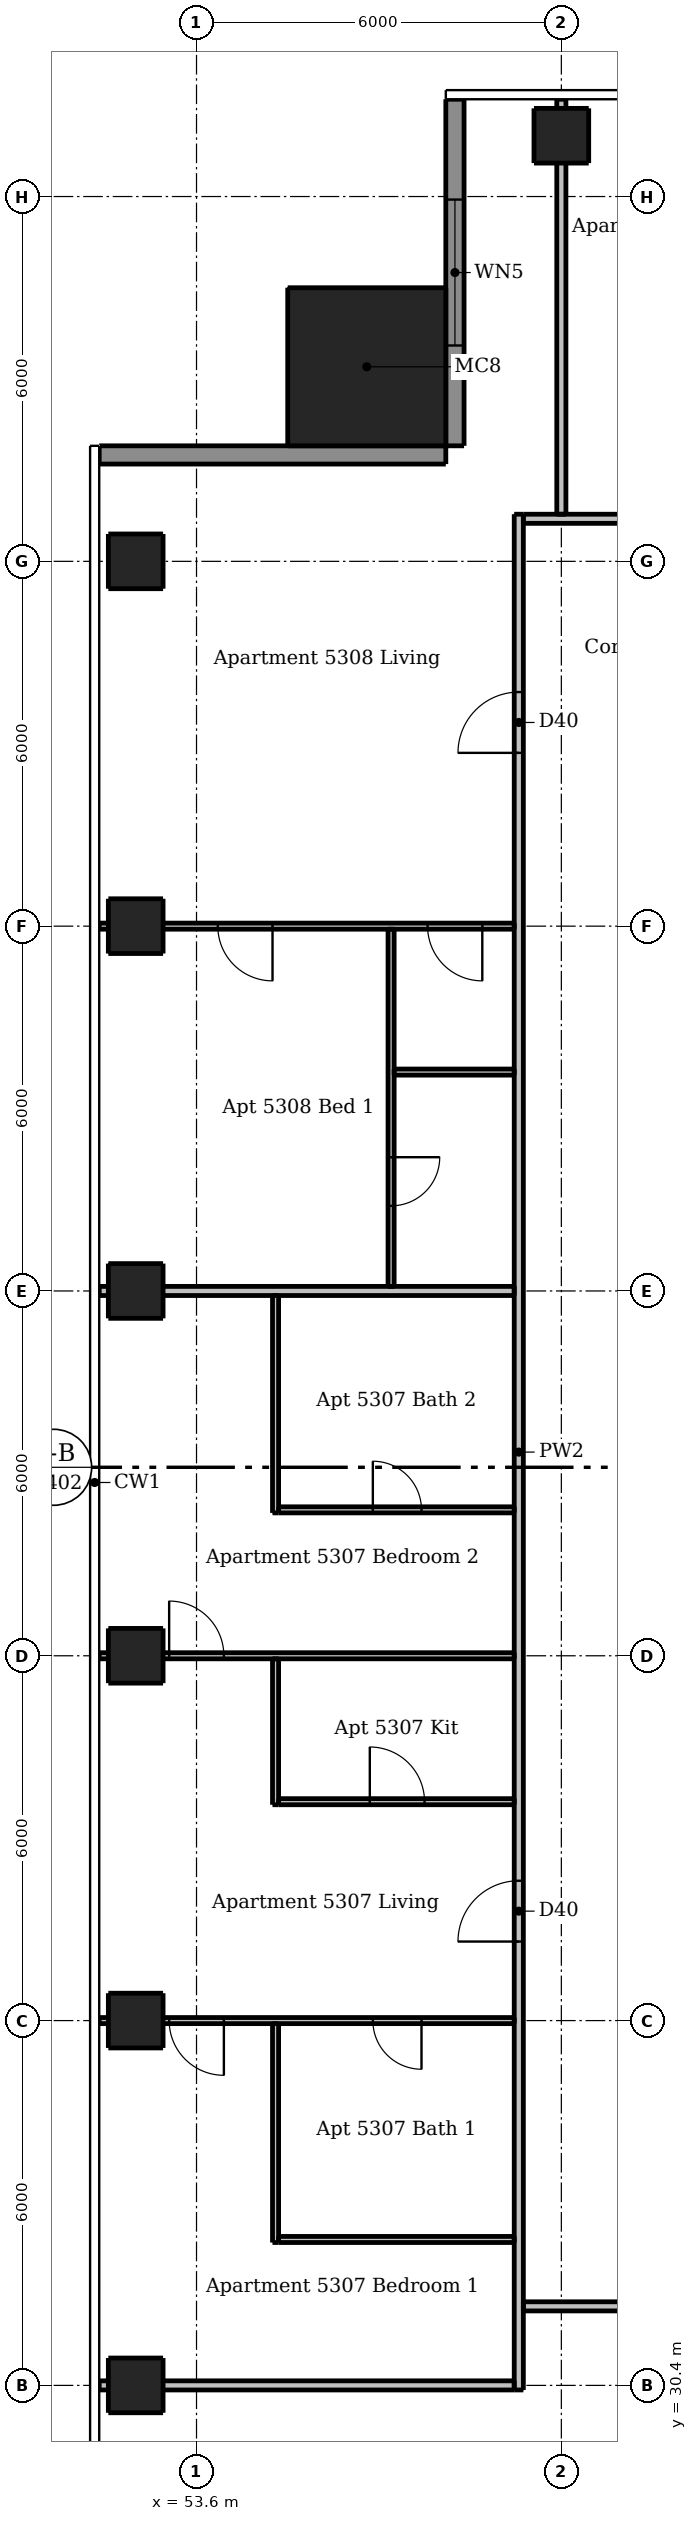
"""IFC4 building model, lengths in metres.
Left out: names, types, materials, properties, quantities, classifications, styles, units other than length and angle.
Written with IfcOpenShell. Run it as: python <this file> out.ifc"""

import sys

from ifc_helpers import new_model, si_unit, direction, frame, frame_2d, origin, origin_2d, place, context, subcontext, project, spatial, rectangle, extrude, element, fill, save


model = new_model("IFC4")
c1 = context("Model", 3, precision=1e-05, world=origin(), true_north=direction((0.0, 1.0)))
c2 = subcontext(c1, "Body", "Model", "MODEL_VIEW")
j1 = project(units=[si_unit("LENGTHUNIT", "METRE"), si_unit("PLANEANGLEUNIT", "RADIAN")], contexts=[c1])
p1 = place(None, origin())
s1 = spatial("IfcSite", under=j1, at=p1, CompositionType="ELEMENT")
p2 = place(p1, origin())
s2 = spatial("IfcBuilding", under=s1, at=p2, CompositionType="ELEMENT")
p3 = place(p2, frame((0.0, 0.0, 200.2)))
s3 = spatial("IfcBuildingStorey", under=s2, at=p3, CompositionType="ELEMENT", Elevation=200.2)
for number, where, z_axis, x_axis in (
    (1, (59.6, 67.4, 0.0), (0.0, 0.0, 1.0), (1.0, 0.0, 0.0)),
    (2, (52.6, 30.4, 0.0), (0.0, 0.0, 1.0), (1.0, 0.0, 0.0)),
    (3, (52.6, 36.4, 0.0), (0.0, 0.0, 1.0), (1.0, 0.0, 0.0)),
    (4, (52.6, 42.4, 0.0), (0.0, 0.0, 1.0), (1.0, 0.0, 0.0)),
    (5, (52.6, 48.4, 0.0), (0.0, 0.0, 1.0), (1.0, 0.0, 0.0)),
    (6, (52.6, 54.4, 0.0), (0.0, 0.0, 1.0), (1.0, 0.0, 0.0)),
    (7, (52.6, 60.4, 0.0), (0.0, 0.0, 1.0), (1.0, 0.0, 0.0)),
):
    element("IfcColumn", number, at=place(p3, frame(where, z_axis=z_axis, x_axis=x_axis)), inside=s3, PredefinedType="COLUMN", context=c2, shape_type="SweptSolid", body=[
        extrude(rectangle(XDim=0.9, YDim=0.9, at=origin_2d()), origin(), (0.0, 0.0, 1.0), 3.05),
    ])
p4 = place(p3, frame((56.4, 63.6, 0.0), z_axis=(0.0, 0.0, 1.0), x_axis=(1.0, 0.0, 0.0)))
e8 = element("IfcColumn", 8, at=p4, inside=s3, PredefinedType="COLUMN", context=c2, shape_type="SweptSolid", body=[
    extrude(rectangle(XDim=2.6, YDim=2.6, at=origin_2d()), origin(), (0.0, 0.0, 1.0), 3.3),
])
p5 = place(p3, frame((57.85, 68.0, 0.0), z_axis=(0.0, 0.0, 1.0), x_axis=(0.0, -1.0, 0.0)))
e9 = element("IfcWall", 9, at=p5, inside=s3, PredefinedType="SOLIDWALL", context=c2, shape_type="SweptSolid", body=[
    extrude(rectangle(XDim=5.7, YDim=0.3, at=frame_2d((2.85, 0.0))), origin(), (0.0, 0.0, 1.0), 3.05),
])
p6 = place(p5, frame((1.65, 0.0, 0.15)))
e10 = element("IfcOpeningElement", 10, at=p6, cuts=e9, PredefinedType="OPENING", context=c2, shape_type="SweptSolid", body=[
    extrude(rectangle(XDim=2.4, YDim=2.1, at=frame_2d((1.2, 1.05))), frame((0.0, 0.16, 0.0), z_axis=(0.0, -1.0, 0.0), x_axis=(1.0, 0.0, 0.0)), (0.0, 0.0, 1.0), 0.32),
])
p7 = place(p3, frame((57.7, 62.15, 0.0), z_axis=(0.0, 0.0, 1.0), x_axis=(-1.0, 0.0, 0.0)))
e11 = element("IfcWall", 11, at=p7, inside=s3, PredefinedType="SOLIDWALL", context=c2, shape_type="SweptSolid", body=[
    extrude(rectangle(XDim=5.7, YDim=0.3, at=frame_2d((2.85, 0.0))), origin(), (0.0, 0.0, 1.0), 3.05),
])
p8 = place(p3, frame((54.9, 32.75, 0.0), z_axis=(0.0, 0.0, 1.0), x_axis=(0.0, 1.0, 0.0)))
e12 = element("IfcWall", 12, at=p8, inside=s3, PredefinedType="PARTITIONING", context=c2, shape_type="SweptSolid", body=[
    extrude(rectangle(XDim=3.6, YDim=0.1, at=frame_2d((1.8, 0.0))), origin(), (0.0, 0.0, 1.0), 3.05),
])
p9 = place(p3, frame((54.9, 39.95, 0.0), z_axis=(0.0, 0.0, 1.0), x_axis=(0.0, 1.0, 0.0)))
e13 = element("IfcWall", 13, at=p9, inside=s3, PredefinedType="PARTITIONING", context=c2, shape_type="SweptSolid", body=[
    extrude(rectangle(XDim=2.4, YDim=0.1, at=frame_2d((1.2, 0.0))), origin(), (0.0, 0.0, 1.0), 3.05),
])
p10 = place(p3, frame((54.9, 44.75, 0.0), z_axis=(0.0, 0.0, 1.0), x_axis=(0.0, 1.0, 0.0)))
e14 = element("IfcWall", 14, at=p10, inside=s3, PredefinedType="PARTITIONING", context=c2, shape_type="SweptSolid", body=[
    extrude(rectangle(XDim=3.575, YDim=0.1, at=frame_2d((1.788, 0.0))), origin(), (0.0, 0.0, 1.0), 3.05),
])
p11 = place(p3, frame((56.8, 54.35, 0.0), z_axis=(0.0, 0.0, 1.0), x_axis=(0.0, -1.0, 0.0)))
e15 = element("IfcWall", 15, at=p11, inside=s3, PredefinedType="PARTITIONING", context=c2, shape_type="SweptSolid", body=[
    extrude(rectangle(XDim=5.875, YDim=0.1, at=frame_2d((2.938, 0.0))), origin(), (0.0, 0.0, 1.0), 3.05),
])
p12 = place(p11, frame((3.75, 0.0, 0.0)))
e16 = element("IfcOpeningElement", 16, at=p12, cuts=e15, PredefinedType="OPENING", context=c2, shape_type="SweptSolid", body=[
    extrude(rectangle(XDim=0.8, YDim=2.1, at=frame_2d((0.4, 1.05))), frame((0.0, 0.06, 0.0), z_axis=(0.0, -1.0, 0.0), x_axis=(1.0, 0.0, 0.0)), (0.0, 0.0, 1.0), 0.12),
])
p13 = place(p3, frame((58.825, 54.4, 0.0), z_axis=(0.0, 0.0, 1.0), x_axis=(-1.0, 0.0, 0.0)))
e17 = element("IfcWall", 17, at=p13, inside=s3, PredefinedType="PARTITIONING", context=c2, shape_type="SweptSolid", body=[
    extrude(rectangle(XDim=6.825, YDim=0.1, at=frame_2d((3.413, 0.0))), origin(), (0.0, 0.0, 1.0), 2.516),
])
p14 = place(p13, frame((0.525, 0.0, 0.0)))
e18 = element("IfcOpeningElement", 18, at=p14, cuts=e17, PredefinedType="OPENING", context=c2, shape_type="SweptSolid", body=[
    extrude(rectangle(XDim=0.9, YDim=2.1, at=frame_2d((0.45, 1.05))), frame((0.0, 0.06, 0.0), z_axis=(0.0, -1.0, 0.0), x_axis=(1.0, 0.0, 0.0)), (0.0, 0.0, 1.0), 0.12),
])
p15 = place(p13, frame((3.975, 0.0, 0.0)))
e19 = element("IfcOpeningElement", 19, at=p15, cuts=e17, PredefinedType="OPENING", context=c2, shape_type="SweptSolid", body=[
    extrude(rectangle(XDim=0.9, YDim=2.1, at=frame_2d((0.45, 1.05))), frame((0.0, 0.06, 0.0), z_axis=(0.0, -1.0, 0.0), x_axis=(1.0, 0.0, 0.0)), (0.0, 0.0, 1.0), 0.12),
])
p16 = place(p3, frame((56.85, 52.0, 0.0), z_axis=(0.0, 0.0, 1.0), x_axis=(1.0, 0.0, 0.0)))
e20 = element("IfcWall", 20, at=p16, inside=s3, PredefinedType="PARTITIONING", context=c2, shape_type="SweptSolid", body=[
    extrude(rectangle(XDim=1.975, YDim=0.1, at=frame_2d((0.987, 0.0))), origin(), (0.0, 0.0, 1.0), 3.05),
])
p17 = place(p3, frame((54.95, 44.8, 0.0), z_axis=(0.0, 0.0, 1.0), x_axis=(1.0, 0.0, 0.0)))
e21 = element("IfcWall", 21, at=p17, inside=s3, PredefinedType="PARTITIONING", context=c2, shape_type="SweptSolid", body=[
    extrude(rectangle(XDim=3.875, YDim=0.1, at=frame_2d((1.938, 0.0))), origin(), (0.0, 0.0, 1.0), 3.05),
])
p18 = place(p17, frame((1.55, 0.0, 0.0)))
e22 = element("IfcOpeningElement", 22, at=p18, cuts=e21, PredefinedType="OPENING", context=c2, shape_type="SweptSolid", body=[
    extrude(rectangle(XDim=0.8, YDim=2.1, at=frame_2d((0.4, 1.05))), frame((0.0, 0.06, 0.0), z_axis=(0.0, -1.0, 0.0), x_axis=(1.0, 0.0, 0.0)), (0.0, 0.0, 1.0), 0.12),
])
p19 = place(p3, frame((52.0, 42.4, 0.0), z_axis=(0.0, 0.0, 1.0), x_axis=(1.0, 0.0, 0.0)))
e23 = element("IfcWall", 23, at=p19, inside=s3, PredefinedType="PARTITIONING", context=c2, shape_type="SweptSolid", body=[
    extrude(rectangle(XDim=6.825, YDim=0.1, at=frame_2d((3.413, 0.0))), origin(), (0.0, 0.0, 1.0), 2.516),
])
p20 = place(p19, frame((1.15, 0.0, 0.0)))
e24 = element("IfcOpeningElement", 24, at=p20, cuts=e23, PredefinedType="OPENING", context=c2, shape_type="SweptSolid", body=[
    extrude(rectangle(XDim=0.9, YDim=2.1, at=frame_2d((0.45, 1.05))), frame((0.0, 0.06, 0.0), z_axis=(0.0, -1.0, 0.0), x_axis=(1.0, 0.0, 0.0)), (0.0, 0.0, 1.0), 0.12),
])
p21 = place(p3, frame((54.95, 40.0, 0.0), z_axis=(0.0, 0.0, 1.0), x_axis=(1.0, 0.0, 0.0)))
e25 = element("IfcWall", 25, at=p21, inside=s3, PredefinedType="PARTITIONING", context=c2, shape_type="SweptSolid", body=[
    extrude(rectangle(XDim=3.875, YDim=0.1, at=frame_2d((1.938, 0.0))), origin(), (0.0, 0.0, 1.0), 3.05),
])
p22 = place(p21, frame((1.5, 0.0, 0.0)))
e26 = element("IfcOpeningElement", 26, at=p22, cuts=e25, PredefinedType="OPENING", context=c2, shape_type="SweptSolid", body=[
    extrude(rectangle(XDim=0.9, YDim=2.1, at=frame_2d((0.45, 1.05))), frame((0.0, 0.06, 0.0), z_axis=(0.0, -1.0, 0.0), x_axis=(1.0, 0.0, 0.0)), (0.0, 0.0, 1.0), 0.12),
])
p23 = place(p3, frame((58.825, 36.4, 0.0), z_axis=(0.0, 0.0, 1.0), x_axis=(-1.0, 0.0, 0.0)))
e27 = element("IfcWall", 27, at=p23, inside=s3, PredefinedType="PARTITIONING", context=c2, shape_type="SweptSolid", body=[
    extrude(rectangle(XDim=6.825, YDim=0.1, at=frame_2d((3.413, 0.0))), origin(), (0.0, 0.0, 1.0), 2.516),
])
p24 = place(p23, frame((4.775, 0.0, 0.0)))
e28 = element("IfcOpeningElement", 28, at=p24, cuts=e27, PredefinedType="OPENING", context=c2, shape_type="SweptSolid", body=[
    extrude(rectangle(XDim=0.9, YDim=2.1, at=frame_2d((0.45, 1.05))), frame((0.0, 0.06, 0.0), z_axis=(0.0, -1.0, 0.0), x_axis=(1.0, 0.0, 0.0)), (0.0, 0.0, 1.0), 0.12),
])
p25 = place(p23, frame((1.525, 0.0, 0.0)))
e29 = element("IfcOpeningElement", 29, at=p25, cuts=e27, PredefinedType="OPENING", context=c2, shape_type="SweptSolid", body=[
    extrude(rectangle(XDim=0.8, YDim=2.1, at=frame_2d((0.4, 1.05))), frame((0.0, 0.06, 0.0), z_axis=(0.0, -1.0, 0.0), x_axis=(1.0, 0.0, 0.0)), (0.0, 0.0, 1.0), 0.12),
])
p26 = place(p3, frame((54.95, 32.8, 0.0), z_axis=(0.0, 0.0, 1.0), x_axis=(1.0, 0.0, 0.0)))
e30 = element("IfcWall", 30, at=p26, inside=s3, PredefinedType="PARTITIONING", context=c2, shape_type="SweptSolid", body=[
    extrude(rectangle(XDim=3.875, YDim=0.1, at=frame_2d((1.938, 0.0))), origin(), (0.0, 0.0, 1.0), 3.05),
])
p27 = place(p3, frame((58.9, 30.325, 0.0), z_axis=(0.0, 0.0, 1.0), x_axis=(0.0, 1.0, 0.0)))
e31 = element("IfcWall", 31, at=p27, inside=s3, PredefinedType="PARTITIONING", context=c2, shape_type="SweptSolid", body=[
    extrude(rectangle(XDim=30.85, YDim=0.15, at=frame_2d((15.425, 0.0))), origin(), (0.0, 0.0, 1.0), 3.05),
])
p28 = place(p27, frame((7.375, 0.0, 0.0)))
e32 = element("IfcOpeningElement", 32, at=p28, cuts=e31, PredefinedType="OPENING", context=c2, shape_type="SweptSolid", body=[
    extrude(rectangle(XDim=1.0, YDim=2.1, at=frame_2d((0.5, 1.05))), frame((0.0, 0.085, 0.0), z_axis=(0.0, -1.0, 0.0), x_axis=(1.0, 0.0, 0.0)), (0.0, 0.0, 1.0), 0.17),
])
p29 = place(p27, frame((26.925, 0.0, 0.0)))
e33 = element("IfcOpeningElement", 33, at=p29, cuts=e31, PredefinedType="OPENING", context=c2, shape_type="SweptSolid", body=[
    extrude(rectangle(XDim=1.0, YDim=2.1, at=frame_2d((0.5, 1.05))), frame((0.0, 0.085, 0.0), z_axis=(0.0, -1.0, 0.0), x_axis=(1.0, 0.0, 0.0)), (0.0, 0.0, 1.0), 0.17),
])
p30 = place(p3, frame((59.6, 61.175, 0.0), z_axis=(0.0, 0.0, 1.0), x_axis=(0.0, 1.0, 0.0)))
e34 = element("IfcWall", 34, at=p30, inside=s3, PredefinedType="PARTITIONING", context=c2, shape_type="SweptSolid", body=[
    extrude(rectangle(XDim=6.825, YDim=0.15, at=frame_2d((3.413, 0.0))), origin(), (0.0, 0.0, 1.0), 2.51),
])
p31 = place(p3, frame((58.975, 61.1, 0.0), z_axis=(0.0, 0.0, 1.0), x_axis=(1.0, 0.0, 0.0)))
e35 = element("IfcWall", 35, at=p31, inside=s3, PredefinedType="PARTITIONING", context=c2, shape_type="SweptSolid", body=[
    extrude(rectangle(XDim=29.25, YDim=0.15, at=frame_2d((14.625, 0.0))), origin(), (0.0, 0.0, 1.0), 3.05),
])
p32 = place(p31, frame((7.925, 0.0, 0.0)))
e36 = element("IfcOpeningElement", 36, at=p32, cuts=e35, PredefinedType="OPENING", context=c2, shape_type="SweptSolid", body=[
    extrude(rectangle(XDim=1.0, YDim=2.1, at=frame_2d((0.5, 1.05))), frame((0.0, 0.085, 0.0), z_axis=(0.0, -1.0, 0.0), x_axis=(1.0, 0.0, 0.0)), (0.0, 0.0, 1.0), 0.17),
])
p33 = place(p31, frame((26.475, 0.0, 0.0)))
e37 = element("IfcOpeningElement", 37, at=p33, cuts=e35, PredefinedType="OPENING", context=c2, shape_type="SweptSolid", body=[
    extrude(rectangle(XDim=1.0, YDim=2.1, at=frame_2d((0.5, 1.05))), frame((0.0, 0.085, 0.0), z_axis=(0.0, -1.0, 0.0), x_axis=(1.0, 0.0, 0.0)), (0.0, 0.0, 1.0), 0.17),
])
p34 = place(p3, frame((52.0, 48.4, 0.0), z_axis=(0.0, 0.0, 1.0), x_axis=(1.0, 0.0, 0.0)))
e38 = element("IfcWall", 38, at=p34, inside=s3, PredefinedType="PARTITIONING", context=c2, shape_type="SweptSolid", body=[
    extrude(rectangle(XDim=6.825, YDim=0.15, at=frame_2d((3.413, 0.0))), origin(), (0.0, 0.0, 1.0), 2.516),
])
p35 = place(p3, frame((89.525, 31.7, 0.0), z_axis=(0.0, 0.0, 1.0), x_axis=(-1.0, 0.0, 0.0)))
e39 = element("IfcWall", 39, at=p35, inside=s3, PredefinedType="PARTITIONING", context=c2, shape_type="SweptSolid", body=[
    extrude(rectangle(XDim=30.55, YDim=0.15, at=frame_2d((15.275, 0.0))), origin(), (0.0, 0.0, 1.0), 3.05),
])
p36 = place(p35, frame((26.775, 0.0, 0.0)))
e40 = element("IfcOpeningElement", 40, at=p36, cuts=e39, PredefinedType="OPENING", context=c2, shape_type="SweptSolid", body=[
    extrude(rectangle(XDim=1.0, YDim=2.1, at=frame_2d((0.5, 1.05))), frame((0.0, 0.085, 0.0), z_axis=(0.0, -1.0, 0.0), x_axis=(1.0, 0.0, 0.0)), (0.0, 0.0, 1.0), 0.17),
])
p37 = place(p35, frame((9.075, 0.0, 0.0)))
e41 = element("IfcOpeningElement", 41, at=p37, cuts=e39, PredefinedType="OPENING", context=c2, shape_type="SweptSolid", body=[
    extrude(rectangle(XDim=1.0, YDim=2.1, at=frame_2d((0.5, 1.05))), frame((0.0, 0.085, 0.0), z_axis=(0.0, -1.0, 0.0), x_axis=(1.0, 0.0, 0.0)), (0.0, 0.0, 1.0), 0.17),
])
p38 = place(p3, frame((52.0, 30.4, 0.0), z_axis=(0.0, 0.0, 1.0), x_axis=(1.0, 0.0, 0.0)))
e42 = element("IfcWall", 42, at=p38, inside=s3, PredefinedType="PARTITIONING", context=c2, shape_type="SweptSolid", body=[
    extrude(rectangle(XDim=6.825, YDim=0.15, at=frame_2d((3.413, 0.0))), origin(), (0.0, 0.0, 1.0), 2.647),
])
p39 = place(p6, origin())
e43 = element("IfcWindow", 43, at=p39, inside=s3, PartitioningType="DOUBLE_PANEL_VERTICAL", PredefinedType="WINDOW", context=c2, shape_type="SweptSolid", body=[
    extrude(rectangle(XDim=2.4, YDim=2.1, at=frame_2d((1.2, 1.05))), frame((0.0, 0.03, 0.0), z_axis=(0.0, -1.0, 0.0), x_axis=(1.0, 0.0, 0.0)), (0.0, 0.0, 1.0), 0.06),
])
fill(e10, e43)
p40 = place(p28, origin())
e44 = element("IfcDoor", 44, at=p40, inside=s3, OperationType="SINGLE_SWING_LEFT", PredefinedType="DOOR", context=c2, shape_type="SweptSolid", body=[
    extrude(rectangle(XDim=1.0, YDim=2.1, at=frame_2d((0.5, 1.05))), frame((0.0, 0.025, 0.0), z_axis=(0.0, -1.0, 0.0), x_axis=(1.0, 0.0, 0.0)), (0.0, 0.0, 1.0), 0.05),
])
fill(e32, e44)
p41 = place(p22, origin())
e45 = element("IfcDoor", 45, at=p41, inside=s3, OperationType="SINGLE_SWING_LEFT", PredefinedType="DOOR", context=c2, shape_type="SweptSolid", body=[
    extrude(rectangle(XDim=0.9, YDim=2.1, at=frame_2d((0.45, 1.05))), frame((0.0, 0.025, 0.0), z_axis=(0.0, -1.0, 0.0), x_axis=(1.0, 0.0, 0.0)), (0.0, 0.0, 1.0), 0.05),
])
fill(e26, e45)
p42 = place(p24, origin())
e46 = element("IfcDoor", 46, at=p42, inside=s3, OperationType="SINGLE_SWING_LEFT", PredefinedType="DOOR", context=c2, shape_type="SweptSolid", body=[
    extrude(rectangle(XDim=0.9, YDim=2.1, at=frame_2d((0.45, 1.05))), frame((0.0, 0.025, 0.0), z_axis=(0.0, -1.0, 0.0), x_axis=(1.0, 0.0, 0.0)), (0.0, 0.0, 1.0), 0.05),
])
fill(e28, e46)
p43 = place(p25, origin())
e47 = element("IfcDoor", 47, at=p43, inside=s3, OperationType="SINGLE_SWING_LEFT", PredefinedType="DOOR", context=c2, shape_type="SweptSolid", body=[
    extrude(rectangle(XDim=0.8, YDim=2.1, at=frame_2d((0.4, 1.05))), frame((0.0, 0.025, 0.0), z_axis=(0.0, -1.0, 0.0), x_axis=(1.0, 0.0, 0.0)), (0.0, 0.0, 1.0), 0.05),
])
fill(e29, e47)
p44 = place(p20, origin())
e48 = element("IfcDoor", 48, at=p44, inside=s3, OperationType="SINGLE_SWING_LEFT", PredefinedType="DOOR", context=c2, shape_type="SweptSolid", body=[
    extrude(rectangle(XDim=0.9, YDim=2.1, at=frame_2d((0.45, 1.05))), frame((0.0, 0.025, 0.0), z_axis=(0.0, -1.0, 0.0), x_axis=(1.0, 0.0, 0.0)), (0.0, 0.0, 1.0), 0.05),
])
fill(e24, e48)
p45 = place(p18, origin())
e49 = element("IfcDoor", 49, at=p45, inside=s3, OperationType="SINGLE_SWING_LEFT", PredefinedType="DOOR", context=c2, shape_type="SweptSolid", body=[
    extrude(rectangle(XDim=0.8, YDim=2.1, at=frame_2d((0.4, 1.05))), frame((0.0, 0.025, 0.0), z_axis=(0.0, -1.0, 0.0), x_axis=(1.0, 0.0, 0.0)), (0.0, 0.0, 1.0), 0.05),
])
fill(e22, e49)
p46 = place(p29, origin())
e50 = element("IfcDoor", 50, at=p46, inside=s3, OperationType="SINGLE_SWING_LEFT", PredefinedType="DOOR", context=c2, shape_type="SweptSolid", body=[
    extrude(rectangle(XDim=1.0, YDim=2.1, at=frame_2d((0.5, 1.05))), frame((0.0, 0.025, 0.0), z_axis=(0.0, -1.0, 0.0), x_axis=(1.0, 0.0, 0.0)), (0.0, 0.0, 1.0), 0.05),
])
fill(e33, e50)
p47 = place(p14, origin())
e51 = element("IfcDoor", 51, at=p47, inside=s3, OperationType="SINGLE_SWING_LEFT", PredefinedType="DOOR", context=c2, shape_type="SweptSolid", body=[
    extrude(rectangle(XDim=0.9, YDim=2.1, at=frame_2d((0.45, 1.05))), frame((0.0, 0.025, 0.0), z_axis=(0.0, -1.0, 0.0), x_axis=(1.0, 0.0, 0.0)), (0.0, 0.0, 1.0), 0.05),
])
fill(e18, e51)
p48 = place(p15, origin())
e52 = element("IfcDoor", 52, at=p48, inside=s3, OperationType="SINGLE_SWING_LEFT", PredefinedType="DOOR", context=c2, shape_type="SweptSolid", body=[
    extrude(rectangle(XDim=0.9, YDim=2.1, at=frame_2d((0.45, 1.05))), frame((0.0, 0.025, 0.0), z_axis=(0.0, -1.0, 0.0), x_axis=(1.0, 0.0, 0.0)), (0.0, 0.0, 1.0), 0.05),
])
fill(e19, e52)
p49 = place(p12, origin())
e53 = element("IfcDoor", 53, at=p49, inside=s3, OperationType="SINGLE_SWING_LEFT", PredefinedType="DOOR", context=c2, shape_type="SweptSolid", body=[
    extrude(rectangle(XDim=0.8, YDim=2.1, at=frame_2d((0.4, 1.05))), frame((0.0, 0.025, 0.0), z_axis=(0.0, -1.0, 0.0), x_axis=(1.0, 0.0, 0.0)), (0.0, 0.0, 1.0), 0.05),
])
fill(e16, e53)
save(model, sys.argv[1])
